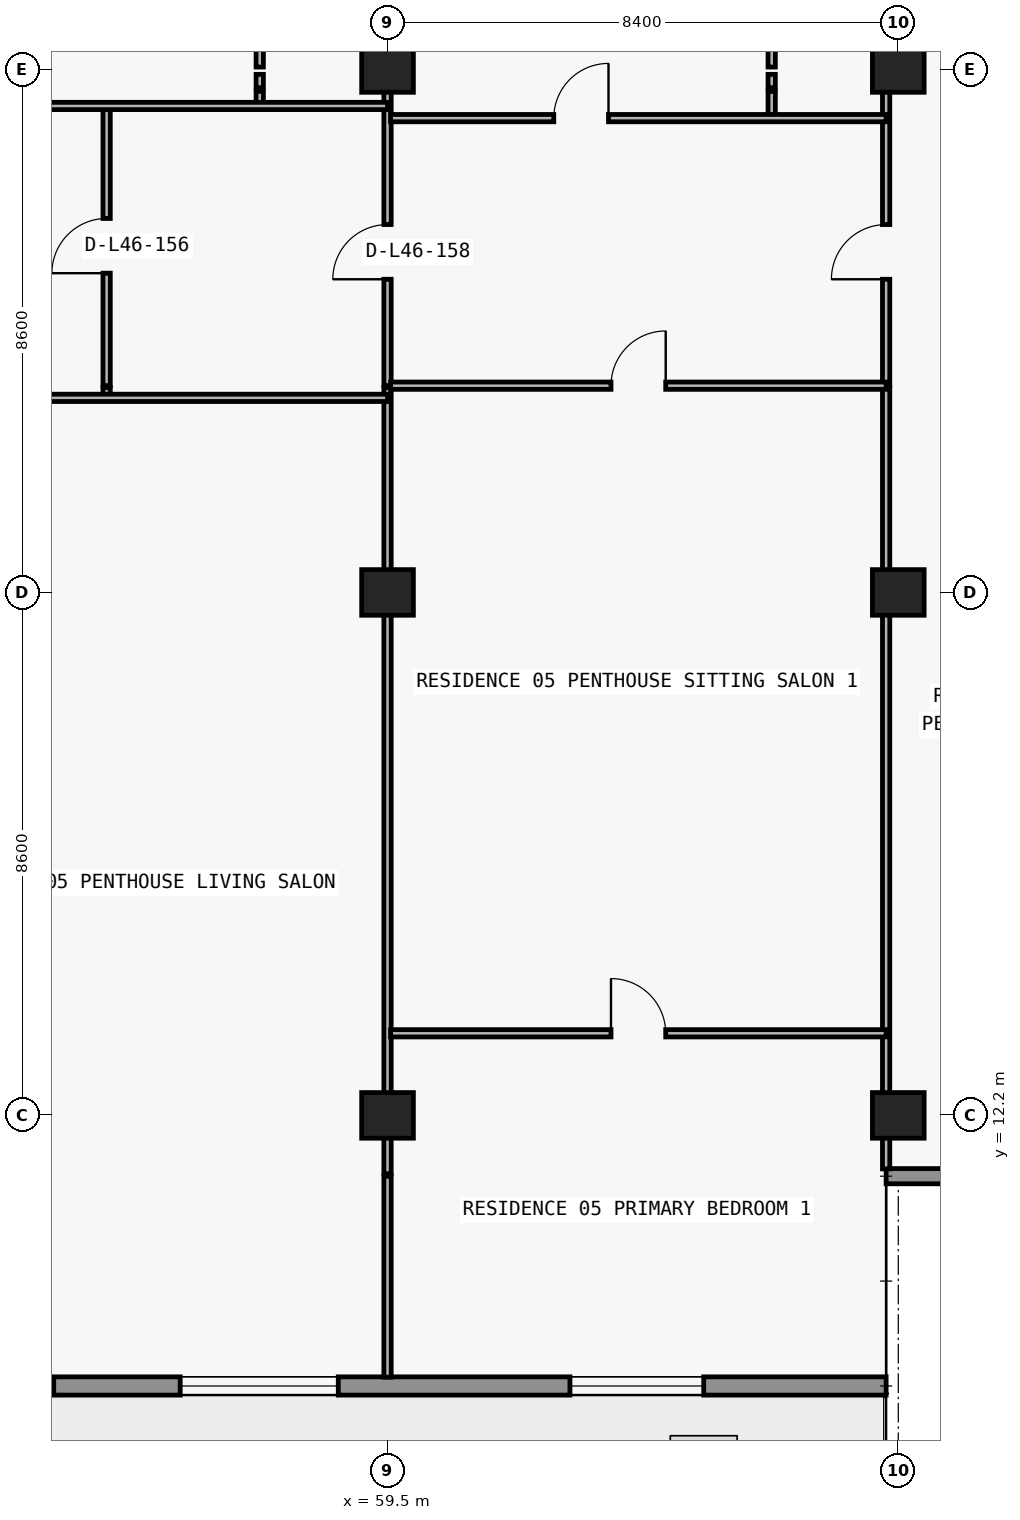
"""IFC4 building model, lengths in metres.
Left out: names, types, materials, properties, quantities, classifications, styles, units other than length and angle.
Written with IfcOpenShell. Run it as: python <this file> out.ifc"""

import sys

from ifc_helpers import new_model, si_unit, direction, frame, frame_2d, origin, origin_2d, place, context, subcontext, project, spatial, rectangle, extrude, element, fill, save


model = new_model("IFC4")
c1 = context("Model", 3, precision=1e-05, world=origin(), true_north=direction((0.0, 1.0)))
c2 = subcontext(c1, "Body", "Model", "MODEL_VIEW")
j1 = project(units=[si_unit("LENGTHUNIT", "METRE"), si_unit("PLANEANGLEUNIT", "RADIAN")], contexts=[c1])
p1 = place(None, origin())
s1 = spatial("IfcSite", under=j1, at=p1, CompositionType="ELEMENT")
p2 = place(p1, origin())
s2 = spatial("IfcBuilding", under=s1, at=p2, CompositionType="ELEMENT")
p3 = place(p2, frame((0.0, 0.0, 167.1)))
s3 = spatial("IfcBuildingStorey", under=s2, at=p3, CompositionType="ELEMENT", Elevation=167.1)
for number, where, z_axis, x_axis in (
    (1, (59.5, 12.2, 0.0), (0.0, 0.0, 1.0), (1.0, 0.0, 0.0)),
    (2, (67.9, 12.2, 0.0), (0.0, 0.0, 1.0), (1.0, 0.0, 0.0)),
    (3, (59.5, 20.8, 0.0), (0.0, 0.0, 1.0), (1.0, 0.0, 0.0)),
    (4, (67.9, 20.8, 0.0), (0.0, 0.0, 1.0), (1.0, 0.0, 0.0)),
    (5, (59.5, 29.4, 0.0), (0.0, 0.0, 1.0), (1.0, 0.0, 0.0)),
    (6, (67.9, 29.4, 0.0), (0.0, 0.0, 1.0), (1.0, 0.0, 0.0)),
):
    element("IfcColumn", number, at=place(p3, frame(where, z_axis=z_axis, x_axis=x_axis)), inside=s3, PredefinedType="COLUMN", context=c2, shape_type="SweptSolid", body=[
        extrude(rectangle(XDim=0.85, YDim=0.75, at=origin_2d()), origin(), (0.0, 0.0, 1.0), 3.05),
    ])
p4 = place(p3, frame((67.7, 7.75, 0.0), z_axis=(0.0, 0.0, 1.0), x_axis=(-1.0, 0.0, 0.0)))
e7 = element("IfcWall", 7, at=p4, inside=s3, PredefinedType="STANDARD", context=c2, shape_type="SweptSolid", body=[
    extrude(rectangle(XDim=57.6, YDim=0.3, at=frame_2d((28.8, 0.0))), origin(), (0.0, 0.0, 1.0), 3.05),
])
p5 = place(p4, frame((54.69, 0.0, 0.0)))
e8 = element("IfcOpeningElement", 8, at=p5, cuts=e7, PredefinedType="OPENING", context=c2, shape_type="SweptSolid", body=[
    extrude(rectangle(XDim=2.0, YDim=2.3, at=frame_2d((1.0, 1.15))), frame((0.0, 0.16, 0.0), z_axis=(0.0, -1.0, 0.0), x_axis=(1.0, 0.0, 0.0)), (0.0, 0.0, 1.0), 0.32),
])
p6 = place(p4, frame((50.21, 0.0, 0.65)))
e9 = element("IfcOpeningElement", 9, at=p6, cuts=e7, PredefinedType="OPENING", context=c2, shape_type="SweptSolid", body=[
    extrude(rectangle(XDim=2.6, YDim=1.85, at=frame_2d((1.3, 0.925))), frame((0.0, 0.16, 0.0), z_axis=(0.0, -1.0, 0.0), x_axis=(1.0, 0.0, 0.0)), (0.0, 0.0, 1.0), 0.32),
])
p7 = place(p4, frame((44.1, 0.0, 0.85)))
e10 = element("IfcOpeningElement", 10, at=p7, cuts=e7, PredefinedType="OPENING", context=c2, shape_type="SweptSolid", body=[
    extrude(rectangle(XDim=2.2, YDim=1.55, at=frame_2d((1.1, 0.775))), frame((0.0, 0.16, 0.0), z_axis=(0.0, -1.0, 0.0), x_axis=(1.0, 0.0, 0.0)), (0.0, 0.0, 1.0), 0.32),
])
p8 = place(p4, frame((37.69, 0.0, 0.0)))
e11 = element("IfcOpeningElement", 11, at=p8, cuts=e7, PredefinedType="OPENING", context=c2, shape_type="SweptSolid", body=[
    extrude(rectangle(XDim=2.0, YDim=2.3, at=frame_2d((1.0, 1.15))), frame((0.0, 0.16, 0.0), z_axis=(0.0, -1.0, 0.0), x_axis=(1.0, 0.0, 0.0)), (0.0, 0.0, 1.0), 0.32),
])
p9 = place(p4, frame((33.59, 0.0, 0.85)))
e12 = element("IfcOpeningElement", 12, at=p9, cuts=e7, PredefinedType="OPENING", context=c2, shape_type="SweptSolid", body=[
    extrude(rectangle(XDim=1.8, YDim=1.55, at=frame_2d((0.9, 0.775))), frame((0.0, 0.16, 0.0), z_axis=(0.0, -1.0, 0.0), x_axis=(1.0, 0.0, 0.0)), (0.0, 0.0, 1.0), 0.32),
])
p10 = place(p4, frame((25.914, 0.0, 0.85)))
e13 = element("IfcOpeningElement", 13, at=p10, cuts=e7, PredefinedType="OPENING", context=c2, shape_type="SweptSolid", body=[
    extrude(rectangle(XDim=2.2, YDim=1.55, at=frame_2d((1.1, 0.775))), frame((0.0, 0.16, 0.0), z_axis=(0.0, -1.0, 0.0), x_axis=(1.0, 0.0, 0.0)), (0.0, 0.0, 1.0), 0.32),
])
p11 = place(p4, frame((21.69, 0.0, 0.0)))
e14 = element("IfcOpeningElement", 14, at=p11, cuts=e7, PredefinedType="OPENING", context=c2, shape_type="SweptSolid", body=[
    extrude(rectangle(XDim=2.0, YDim=2.3, at=frame_2d((1.0, 1.15))), frame((0.0, 0.16, 0.0), z_axis=(0.0, -1.0, 0.0), x_axis=(1.0, 0.0, 0.0)), (0.0, 0.0, 1.0), 0.32),
])
p12 = place(p4, frame((17.59, 0.0, 0.85)))
e15 = element("IfcOpeningElement", 15, at=p12, cuts=e7, PredefinedType="OPENING", context=c2, shape_type="SweptSolid", body=[
    extrude(rectangle(XDim=1.8, YDim=1.55, at=frame_2d((0.9, 0.775))), frame((0.0, 0.16, 0.0), z_axis=(0.0, -1.0, 0.0), x_axis=(1.0, 0.0, 0.0)), (0.0, 0.0, 1.0), 0.32),
])
p13 = place(p4, frame((13.69, 0.0, 0.0)))
e16 = element("IfcOpeningElement", 16, at=p13, cuts=e7, PredefinedType="OPENING", context=c2, shape_type="SweptSolid", body=[
    extrude(rectangle(XDim=2.0, YDim=2.3, at=frame_2d((1.0, 1.15))), frame((0.0, 0.16, 0.0), z_axis=(0.0, -1.0, 0.0), x_axis=(1.0, 0.0, 0.0)), (0.0, 0.0, 1.0), 0.32),
])
p14 = place(p4, frame((9.01, 0.0, 0.65)))
e17 = element("IfcOpeningElement", 17, at=p14, cuts=e7, PredefinedType="OPENING", context=c2, shape_type="SweptSolid", body=[
    extrude(rectangle(XDim=2.6, YDim=1.85, at=frame_2d((1.3, 0.925))), frame((0.0, 0.16, 0.0), z_axis=(0.0, -1.0, 0.0), x_axis=(1.0, 0.0, 0.0)), (0.0, 0.0, 1.0), 0.32),
])
p15 = place(p4, frame((3.0, 0.0, 0.85)))
e18 = element("IfcOpeningElement", 18, at=p15, cuts=e7, PredefinedType="OPENING", context=c2, shape_type="SweptSolid", body=[
    extrude(rectangle(XDim=2.2, YDim=1.55, at=frame_2d((1.1, 0.775))), frame((0.0, 0.16, 0.0), z_axis=(0.0, -1.0, 0.0), x_axis=(1.0, 0.0, 0.0)), (0.0, 0.0, 1.0), 0.32),
])
p16 = place(p3, frame((67.7, 11.2, 0.0), z_axis=(0.0, 0.0, 1.0), x_axis=(1.0, 0.0, 0.0)))
e19 = element("IfcWall", 19, at=p16, inside=s3, PredefinedType="ELEMENTEDWALL", context=c2, shape_type="SweptSolid", body=[
    extrude(rectangle(XDim=3.85, YDim=0.25, at=frame_2d((1.925, 0.0))), origin(), (0.0, 0.0, 1.0), 3.05),
])
p17 = place(p3, frame((54.88, 24.0, 0.0), z_axis=(0.0, 0.0, 1.0), x_axis=(0.0, 1.0, 0.0)))
e20 = element("IfcWall", 20, at=p17, inside=s3, PredefinedType="PARTITIONING", context=c2, shape_type="SweptSolid", body=[
    extrude(rectangle(XDim=0.17, YDim=0.12, at=frame_2d((0.085, 0.0))), origin(), (0.0, 0.0, 1.0), 3.05),
])
p18 = place(p3, frame((54.88, 24.2, 0.0), z_axis=(0.0, 0.0, 1.0), x_axis=(0.0, 1.0, 0.0)))
e21 = element("IfcWall", 21, at=p18, inside=s3, PredefinedType="PARTITIONING", context=c2, shape_type="SweptSolid", body=[
    extrude(rectangle(XDim=4.6, YDim=0.12, at=frame_2d((2.3, 0.0))), origin(), (0.0, 0.0, 1.0), 3.05),
])
p19 = place(p18, frame((1.85, 0.0, 0.0)))
e22 = element("IfcOpeningElement", 22, at=p19, cuts=e21, PredefinedType="OPENING", context=c2, shape_type="SweptSolid", body=[
    extrude(rectangle(XDim=0.9, YDim=2.15, at=frame_2d((0.45, 1.075))), frame((0.0, 0.07, 0.0), z_axis=(0.0, -1.0, 0.0), x_axis=(1.0, 0.0, 0.0)), (0.0, 0.0, 1.0), 0.14),
])
p20 = place(p3, frame((57.398, 28.8, 0.0), z_axis=(0.0, 0.0, 1.0), x_axis=(0.0, 1.0, 0.0)))
e23 = element("IfcWall", 23, at=p20, inside=s3, PredefinedType="PARTITIONING", context=c2, shape_type="SweptSolid", body=[
    extrude(rectangle(XDim=0.24, YDim=0.12, at=frame_2d((0.12, 0.0))), origin(), (0.0, 0.0, 1.0), 3.05),
])
p21 = place(p3, frame((57.398, 29.1, 0.0), z_axis=(0.0, 0.0, 1.0), x_axis=(0.0, 1.0, 0.0)))
e24 = element("IfcWall", 24, at=p21, inside=s3, PredefinedType="PARTITIONING", context=c2, shape_type="SweptSolid", body=[
    extrude(rectangle(XDim=0.22, YDim=0.12, at=frame_2d((0.11, 0.0))), origin(), (0.0, 0.0, 1.0), 3.05),
])
p22 = place(p3, frame((57.398, 29.44, 0.0), z_axis=(0.0, 0.0, 1.0), x_axis=(0.0, 1.0, 0.0)))
e25 = element("IfcWall", 25, at=p22, inside=s3, PredefinedType="PARTITIONING", context=c2, shape_type="SweptSolid", body=[
    extrude(rectangle(XDim=4.26, YDim=0.12, at=frame_2d((2.13, 0.0))), origin(), (0.0, 0.0, 1.0), 3.05),
])
p23 = place(p22, frame((1.705, 0.0, 0.0)))
e26 = element("IfcOpeningElement", 26, at=p23, cuts=e25, PredefinedType="OPENING", context=c2, shape_type="SweptSolid", body=[
    extrude(rectangle(XDim=0.85, YDim=2.1, at=frame_2d((0.425, 1.05))), frame((0.0, 0.07, 0.0), z_axis=(0.0, -1.0, 0.0), x_axis=(1.0, 0.0, 0.0)), (0.0, 0.0, 1.0), 0.14),
])
p24 = place(p3, frame((59.5, 7.895, 0.0), z_axis=(0.0, 0.0, 1.0), x_axis=(0.0, 1.0, 0.0)))
e27 = element("IfcWall", 27, at=p24, inside=s3, PredefinedType="PARTITIONING", context=c2, shape_type="SweptSolid", body=[
    extrude(rectangle(XDim=3.305, YDim=0.12, at=frame_2d((1.652, 0.0))), origin(), (0.0, 0.0, 1.0), 3.05),
])
p25 = place(p3, frame((59.5, 11.24, 0.0), z_axis=(0.0, 0.0, 1.0), x_axis=(0.0, 1.0, 0.0)))
e28 = element("IfcWall", 28, at=p25, inside=s3, PredefinedType="PARTITIONING", context=c2, shape_type="SweptSolid", body=[
    extrude(rectangle(XDim=12.93, YDim=0.12, at=frame_2d((6.465, 0.0))), origin(), (0.0, 0.0, 1.0), 2.263),
])
p26 = place(p3, frame((59.5, 24.2, 0.0), z_axis=(0.0, 0.0, 1.0), x_axis=(0.0, 1.0, 0.0)))
e29 = element("IfcWall", 29, at=p26, inside=s3, PredefinedType="PARTITIONING", context=c2, shape_type="SweptSolid", body=[
    extrude(rectangle(XDim=4.84, YDim=0.12, at=frame_2d((2.42, 0.0))), origin(), (0.0, 0.0, 1.0), 2.263),
])
p27 = place(p26, frame((1.75, 0.0, 0.0)))
e30 = element("IfcOpeningElement", 30, at=p27, cuts=e29, PredefinedType="OPENING", context=c2, shape_type="SweptSolid", body=[
    extrude(rectangle(XDim=0.9, YDim=2.15, at=frame_2d((0.45, 1.075))), frame((0.0, 0.07, 0.0), z_axis=(0.0, -1.0, 0.0), x_axis=(1.0, 0.0, 0.0)), (0.0, 0.0, 1.0), 0.14),
])
p28 = place(p3, frame((59.5, 29.1, 0.0), z_axis=(0.0, 0.0, 1.0), x_axis=(0.0, 1.0, 0.0)))
e31 = element("IfcWall", 31, at=p28, inside=s3, PredefinedType="PARTITIONING", context=c2, shape_type="SweptSolid", body=[
    extrude(rectangle(XDim=0.22, YDim=0.12, at=frame_2d((0.11, 0.0))), origin(), (0.0, 0.0, 1.0), 3.05),
])
p29 = place(p3, frame((59.5, 29.44, 0.0), z_axis=(0.0, 0.0, 1.0), x_axis=(0.0, 1.0, 0.0)))
e32 = element("IfcWall", 32, at=p29, inside=s3, PredefinedType="PARTITIONING", context=c2, shape_type="SweptSolid", body=[
    extrude(rectangle(XDim=4.26, YDim=0.12, at=frame_2d((2.13, 0.0))), origin(), (0.0, 0.0, 1.0), 2.263),
])
p30 = place(p3, frame((65.818, 28.6, 0.0), z_axis=(0.0, 0.0, 1.0), x_axis=(0.0, 1.0, 0.0)))
e33 = element("IfcWall", 33, at=p30, inside=s3, PredefinedType="PARTITIONING", context=c2, shape_type="SweptSolid", body=[
    extrude(rectangle(XDim=0.44, YDim=0.12, at=frame_2d((0.22, 0.0))), origin(), (0.0, 0.0, 1.0), 3.05),
])
p31 = place(p3, frame((65.818, 29.1, 0.0), z_axis=(0.0, 0.0, 1.0), x_axis=(0.0, 1.0, 0.0)))
e34 = element("IfcWall", 34, at=p31, inside=s3, PredefinedType="PARTITIONING", context=c2, shape_type="SweptSolid", body=[
    extrude(rectangle(XDim=0.22, YDim=0.12, at=frame_2d((0.11, 0.0))), origin(), (0.0, 0.0, 1.0), 3.05),
])
p32 = place(p3, frame((65.818, 29.44, 0.0), z_axis=(0.0, 0.0, 1.0), x_axis=(0.0, 1.0, 0.0)))
e35 = element("IfcWall", 35, at=p32, inside=s3, PredefinedType="PARTITIONING", context=c2, shape_type="SweptSolid", body=[
    extrude(rectangle(XDim=4.26, YDim=0.12, at=frame_2d((2.13, 0.0))), origin(), (0.0, 0.0, 1.0), 3.05),
])
p33 = place(p32, frame((1.705, 0.0, 0.0)))
e36 = element("IfcOpeningElement", 36, at=p33, cuts=e35, PredefinedType="OPENING", context=c2, shape_type="SweptSolid", body=[
    extrude(rectangle(XDim=0.85, YDim=2.1, at=frame_2d((0.425, 1.05))), frame((0.0, 0.07, 0.0), z_axis=(0.0, -1.0, 0.0), x_axis=(1.0, 0.0, 0.0)), (0.0, 0.0, 1.0), 0.14),
])
p34 = place(p3, frame((67.7, 11.32, 0.0), z_axis=(0.0, 0.0, 1.0), x_axis=(0.0, 1.0, 0.0)))
e37 = element("IfcWall", 37, at=p34, inside=s3, PredefinedType="PARTITIONING", context=c2, shape_type="SweptSolid", body=[
    extrude(rectangle(XDim=12.85, YDim=0.12, at=frame_2d((6.425, 0.0))), origin(), (0.0, 0.0, 1.0), 2.263),
])
p35 = place(p3, frame((67.7, 24.2, 0.0), z_axis=(0.0, 0.0, 1.0), x_axis=(0.0, 1.0, 0.0)))
e38 = element("IfcWall", 38, at=p35, inside=s3, PredefinedType="PARTITIONING", context=c2, shape_type="SweptSolid", body=[
    extrude(rectangle(XDim=4.84, YDim=0.12, at=frame_2d((2.42, 0.0))), origin(), (0.0, 0.0, 1.0), 2.263),
])
p36 = place(p35, frame((1.75, 0.0, 0.0)))
e39 = element("IfcOpeningElement", 39, at=p36, cuts=e38, PredefinedType="OPENING", context=c2, shape_type="SweptSolid", body=[
    extrude(rectangle(XDim=0.9, YDim=2.15, at=frame_2d((0.45, 1.075))), frame((0.0, 0.07, 0.0), z_axis=(0.0, -1.0, 0.0), x_axis=(1.0, 0.0, 0.0)), (0.0, 0.0, 1.0), 0.14),
])
p37 = place(p3, frame((67.7, 29.1, 0.0), z_axis=(0.0, 0.0, 1.0), x_axis=(0.0, 1.0, 0.0)))
e40 = element("IfcWall", 40, at=p37, inside=s3, PredefinedType="PARTITIONING", context=c2, shape_type="SweptSolid", body=[
    extrude(rectangle(XDim=0.22, YDim=0.12, at=frame_2d((0.11, 0.0))), origin(), (0.0, 0.0, 1.0), 3.05),
])
p38 = place(p3, frame((67.7, 29.44, 0.0), z_axis=(0.0, 0.0, 1.0), x_axis=(0.0, 1.0, 0.0)))
e41 = element("IfcWall", 41, at=p38, inside=s3, PredefinedType="PARTITIONING", context=c2, shape_type="SweptSolid", body=[
    extrude(rectangle(XDim=4.26, YDim=0.12, at=frame_2d((2.13, 0.0))), origin(), (0.0, 0.0, 1.0), 2.263),
])
p39 = place(p3, frame((59.55, 13.55, 0.0), z_axis=(0.0, 0.0, 1.0), x_axis=(1.0, 0.0, 0.0)))
e42 = element("IfcWall", 42, at=p39, inside=s3, PredefinedType="PARTITIONING", context=c2, shape_type="SweptSolid", body=[
    extrude(rectangle(XDim=8.15, YDim=0.12, at=frame_2d((4.075, 0.0))), origin(), (0.0, 0.0, 1.0), 3.05),
])
p40 = place(p39, frame((3.625, 0.0, 0.0)))
e43 = element("IfcOpeningElement", 43, at=p40, cuts=e42, PredefinedType="OPENING", context=c2, shape_type="SweptSolid", body=[
    extrude(rectangle(XDim=0.9, YDim=2.15, at=frame_2d((0.45, 1.075))), frame((0.0, 0.07, 0.0), z_axis=(0.0, -1.0, 0.0), x_axis=(1.0, 0.0, 0.0)), (0.0, 0.0, 1.0), 0.14),
])
p41 = place(p3, frame((51.32, 24.0, 0.0), z_axis=(0.0, 0.0, 1.0), x_axis=(1.0, 0.0, 0.0)))
e44 = element("IfcWall", 44, at=p41, inside=s3, PredefinedType="PARTITIONING", context=c2, shape_type="SweptSolid", body=[
    extrude(rectangle(XDim=8.18, YDim=0.12, at=frame_2d((4.09, 0.0))), origin(), (0.0, 0.0, 1.0), 3.05),
])
p42 = place(p41, frame((1.33, 0.0, 0.0)))
e45 = element("IfcOpeningElement", 45, at=p42, cuts=e44, PredefinedType="OPENING", context=c2, shape_type="SweptSolid", body=[
    extrude(rectangle(XDim=0.9, YDim=2.15, at=frame_2d((0.45, 1.075))), frame((0.0, 0.07, 0.0), z_axis=(0.0, -1.0, 0.0), x_axis=(1.0, 0.0, 0.0)), (0.0, 0.0, 1.0), 0.14),
])
p43 = place(p3, frame((59.55, 24.2, 0.0), z_axis=(0.0, 0.0, 1.0), x_axis=(1.0, 0.0, 0.0)))
e46 = element("IfcWall", 46, at=p43, inside=s3, PredefinedType="PARTITIONING", context=c2, shape_type="SweptSolid", body=[
    extrude(rectangle(XDim=8.15, YDim=0.12, at=frame_2d((4.075, 0.0))), origin(), (0.0, 0.0, 1.0), 3.05),
])
p44 = place(p43, frame((3.625, 0.0, 0.0)))
e47 = element("IfcOpeningElement", 47, at=p44, cuts=e46, PredefinedType="OPENING", context=c2, shape_type="SweptSolid", body=[
    extrude(rectangle(XDim=0.9, YDim=2.15, at=frame_2d((0.45, 1.075))), frame((0.0, 0.07, 0.0), z_axis=(0.0, -1.0, 0.0), x_axis=(1.0, 0.0, 0.0)), (0.0, 0.0, 1.0), 0.14),
])
p45 = place(p3, frame((59.55, 28.6, 0.0), z_axis=(0.0, 0.0, 1.0), x_axis=(1.0, 0.0, 0.0)))
e48 = element("IfcWall", 48, at=p45, inside=s3, PredefinedType="PARTITIONING", context=c2, shape_type="SweptSolid", body=[
    extrude(rectangle(XDim=8.15, YDim=0.12, at=frame_2d((4.075, 0.0))), origin(), (0.0, 0.0, 1.0), 3.05),
])
p46 = place(p45, frame((2.684, 0.0, 0.0)))
e49 = element("IfcOpeningElement", 49, at=p46, cuts=e48, PredefinedType="OPENING", context=c2, shape_type="SweptSolid", body=[
    extrude(rectangle(XDim=0.9, YDim=2.15, at=frame_2d((0.45, 1.075))), frame((0.0, 0.07, 0.0), z_axis=(0.0, -1.0, 0.0), x_axis=(1.0, 0.0, 0.0)), (0.0, 0.0, 1.0), 0.14),
])
p47 = place(p3, frame((51.32, 28.8, 0.0), z_axis=(0.0, 0.0, 1.0), x_axis=(1.0, 0.0, 0.0)))
e50 = element("IfcWall", 50, at=p47, inside=s3, PredefinedType="PARTITIONING", context=c2, shape_type="SweptSolid", body=[
    extrude(rectangle(XDim=8.18, YDim=0.12, at=frame_2d((4.09, 0.0))), origin(), (0.0, 0.0, 1.0), 3.05),
])
p48 = place(p47, frame((1.33, 0.0, 0.0)))
e51 = element("IfcOpeningElement", 51, at=p48, cuts=e50, PredefinedType="OPENING", context=c2, shape_type="SweptSolid", body=[
    extrude(rectangle(XDim=0.9, YDim=2.15, at=frame_2d((0.45, 1.075))), frame((0.0, 0.07, 0.0), z_axis=(0.0, -1.0, 0.0), x_axis=(1.0, 0.0, 0.0)), (0.0, 0.0, 1.0), 0.14),
])
p49 = place(p13, origin())
e52 = element("IfcDoor", 52, at=p49, inside=s3, OperationType="DOUBLE_DOOR_SLIDING", PredefinedType="DOOR", context=c2, shape_type="SweptSolid", body=[
    extrude(rectangle(XDim=2.0, YDim=2.3, at=frame_2d((1.0, 1.15))), frame((0.0, 0.025, 0.0), z_axis=(0.0, -1.0, 0.0), x_axis=(1.0, 0.0, 0.0)), (0.0, 0.0, 1.0), 0.05),
])
fill(e16, e52)
p50 = place(p14, origin())
e53 = element("IfcWindow", 53, at=p50, inside=s3, PartitioningType="SINGLE_PANEL", PredefinedType="WINDOW", context=c2, shape_type="SweptSolid", body=[
    extrude(rectangle(XDim=2.6, YDim=1.85, at=frame_2d((1.3, 0.925))), frame((0.0, 0.03, 0.0), z_axis=(0.0, -1.0, 0.0), x_axis=(1.0, 0.0, 0.0)), (0.0, 0.0, 1.0), 0.06),
])
fill(e17, e53)
p51 = place(p15, origin())
e54 = element("IfcWindow", 54, at=p51, inside=s3, PartitioningType="SINGLE_PANEL", PredefinedType="WINDOW", context=c2, shape_type="SweptSolid", body=[
    extrude(rectangle(XDim=2.2, YDim=1.55, at=frame_2d((1.1, 0.775))), frame((0.0, 0.03, 0.0), z_axis=(0.0, -1.0, 0.0), x_axis=(1.0, 0.0, 0.0)), (0.0, 0.0, 1.0), 0.06),
])
fill(e18, e54)
p52 = place(p19, origin())
e55 = element("IfcDoor", 55, at=p52, inside=s3, OperationType="SINGLE_SWING_LEFT", PredefinedType="DOOR", context=c2, shape_type="SweptSolid", body=[
    extrude(rectangle(XDim=0.9, YDim=2.15, at=frame_2d((0.45, 1.075))), frame((0.0, 0.025, 0.0), z_axis=(0.0, -1.0, 0.0), x_axis=(1.0, 0.0, 0.0)), (0.0, 0.0, 1.0), 0.05),
])
fill(e22, e55)
p53 = place(p27, origin())
e56 = element("IfcDoor", 56, at=p53, inside=s3, OperationType="SINGLE_SWING_LEFT", PredefinedType="DOOR", context=c2, shape_type="SweptSolid", body=[
    extrude(rectangle(XDim=0.9, YDim=2.15, at=frame_2d((0.45, 1.075))), frame((0.0, 0.025, 0.0), z_axis=(0.0, -1.0, 0.0), x_axis=(1.0, 0.0, 0.0)), (0.0, 0.0, 1.0), 0.05),
])
fill(e30, e56)
p54 = place(p46, origin())
e57 = element("IfcDoor", 57, at=p54, inside=s3, OperationType="SINGLE_SWING_RIGHT", PredefinedType="DOOR", context=c2, shape_type="SweptSolid", body=[
    extrude(rectangle(XDim=0.9, YDim=2.15, at=frame_2d((0.45, 1.075))), frame((0.0, 0.025, 0.0), z_axis=(0.0, -1.0, 0.0), x_axis=(1.0, 0.0, 0.0)), (0.0, 0.0, 1.0), 0.05),
])
fill(e49, e57)
p55 = place(p44, origin())
e58 = element("IfcDoor", 58, at=p55, inside=s3, OperationType="SINGLE_SWING_RIGHT", PredefinedType="DOOR", context=c2, shape_type="SweptSolid", body=[
    extrude(rectangle(XDim=0.9, YDim=2.15, at=frame_2d((0.45, 1.075))), frame((0.0, 0.025, 0.0), z_axis=(0.0, -1.0, 0.0), x_axis=(1.0, 0.0, 0.0)), (0.0, 0.0, 1.0), 0.05),
])
fill(e47, e58)
p56 = place(p40, origin())
e59 = element("IfcDoor", 59, at=p56, inside=s3, OperationType="SINGLE_SWING_LEFT", PredefinedType="DOOR", context=c2, shape_type="SweptSolid", body=[
    extrude(rectangle(XDim=0.9, YDim=2.15, at=frame_2d((0.45, 1.075))), frame((0.0, 0.025, 0.0), z_axis=(0.0, -1.0, 0.0), x_axis=(1.0, 0.0, 0.0)), (0.0, 0.0, 1.0), 0.05),
])
fill(e43, e59)
p57 = place(p36, origin())
e60 = element("IfcDoor", 60, at=p57, inside=s3, OperationType="SINGLE_SWING_LEFT", PredefinedType="DOOR", context=c2, shape_type="SweptSolid", body=[
    extrude(rectangle(XDim=0.9, YDim=2.15, at=frame_2d((0.45, 1.075))), frame((0.0, 0.025, 0.0), z_axis=(0.0, -1.0, 0.0), x_axis=(1.0, 0.0, 0.0)), (0.0, 0.0, 1.0), 0.05),
])
fill(e39, e60)
save(model, sys.argv[1])
